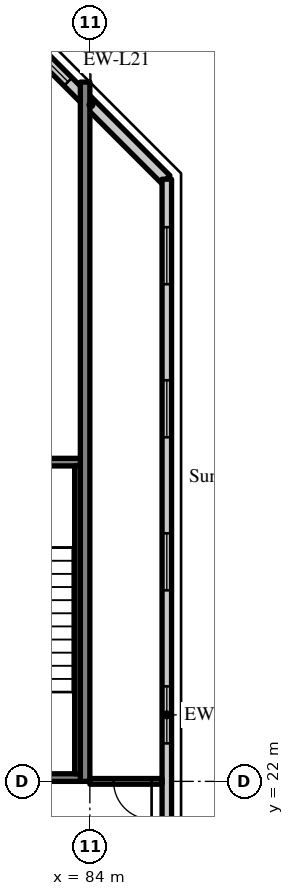
"""IFC4 building model, lengths in metres.
Left out: names, types, materials, properties, quantities, classifications, styles, units other than length and angle.
Written with IfcOpenShell. Run it as: python <this file> out.ifc"""

import sys

from ifc_helpers import new_model, si_unit, direction, frame, frame_2d, origin, place, context, subcontext, project, spatial, rectangle, extrude, source, transform, mapped, element, fill, save


model = new_model("IFC4")
c1 = context("Model", 3, precision=1e-05, world=origin(), true_north=direction((0.0, 1.0)))
c2 = subcontext(c1, "Body", "Model", "MODEL_VIEW")
j1 = project(units=[si_unit("LENGTHUNIT", "METRE"), si_unit("PLANEANGLEUNIT", "RADIAN")], contexts=[c1])
p1 = place(None, origin())
s1 = spatial("IfcSite", under=j1, at=p1, CompositionType="ELEMENT")
p2 = place(p1, origin())
s2 = spatial("IfcBuilding", under=s1, at=p2, CompositionType="ELEMENT")
p3 = place(p2, frame((0.0, 0.0, 277.7)))
s3 = spatial("IfcBuildingStorey", under=s2, at=p3, CompositionType="ELEMENT", Elevation=277.7)
m1 = source(origin(), c2, "Body", "SweptSolid", [
    extrude(rectangle(XDim=18.4, YDim=0.25, at=frame_2d((9.2, 0.0))), origin(), (0.0, 0.0, 1.0), 3.72),
])
p4 = place(p3, frame((83.875, 22.0, 0.0), z_axis=(0.0, 0.0, 1.0), x_axis=(0.0, 1.0, 0.0)))
e1 = element("IfcWall", 1, at=p4, inside=s3, PredefinedType="SHEAR", context=c2, shape_type="MappedRepresentation", body=[
    mapped(m1, transform((0.0, 0.0, 0.0), scale=1.0)),
])
m2 = source(origin(), c2, "Body", "SweptSolid", [
    extrude(rectangle(XDim=5.576, YDim=0.3, at=frame_2d((2.788, 0.0))), origin(), (0.0, 0.0, 1.0), 3.72),
])
p5 = place(p3, frame((86.0, 37.834, 0.0), z_axis=(0.0, 0.0, 1.0), x_axis=(-0.707106781187, 0.707106781187, 0.0)))
e2 = element("IfcWall", 2, at=p5, inside=s3, PredefinedType="SOLIDWALL", context=c2, shape_type="MappedRepresentation", body=[
    mapped(m2, transform((0.0, 0.0, 0.0), scale=1.0)),
])
m3 = source(origin(), c2, "Body", "SweptSolid", [
    extrude(rectangle(XDim=1.8, YDim=1.5, at=frame_2d((0.9, 0.75))), frame((0.0, 0.16, 0.0), z_axis=(0.0, -1.0, 0.0), x_axis=(1.0, 0.0, 0.0)), (0.0, 0.0, 1.0), 0.32),
])
p6 = place(p5, frame((3.641, 0.0, 0.9)))
e3 = element("IfcOpeningElement", 3, at=p6, cuts=e2, PredefinedType="OPENING", context=c2, shape_type="MappedRepresentation", body=[
    mapped(m3, transform((0.0, 0.0, 0.0), scale=1.0)),
])
m4 = source(origin(), c2, "Body", "SweptSolid", [
    extrude(rectangle(XDim=28.189, YDim=0.25, at=frame_2d((14.095, 0.0))), origin(), (0.0, 0.0, 1.0), 3.72),
])
p7 = place(p3, frame((86.025, 9.655, 0.0), z_axis=(0.0, 0.0, 1.0), x_axis=(0.0, 1.0, 0.0)))
e4 = element("IfcWall", 4, at=p7, inside=s3, PredefinedType="SOLIDWALL", context=c2, shape_type="MappedRepresentation", body=[
    mapped(m4, transform((0.0, 0.0, 0.0), scale=1.0)),
])
m5 = source(origin(), c2, "Body", "SweptSolid", [
    extrude(rectangle(XDim=1.5, YDim=1.5, at=frame_2d((0.75, 0.75))), frame((0.0, 0.135, 0.0), z_axis=(0.0, -1.0, 0.0), x_axis=(1.0, 0.0, 0.0)), (0.0, 0.0, 1.0), 0.27),
])
p8 = place(p7, frame((1.263, 0.0, 0.9)))
e5 = element("IfcOpeningElement", 5, at=p8, cuts=e4, PredefinedType="OPENING", context=c2, shape_type="MappedRepresentation", body=[
    mapped(m5, transform((0.0, 0.0, 0.0), scale=1.0)),
])
p9 = place(p7, frame((5.291, 0.0, 0.9)))
e6 = element("IfcOpeningElement", 6, at=p9, cuts=e4, PredefinedType="OPENING", context=c2, shape_type="MappedRepresentation", body=[
    mapped(m5, transform((0.0, 0.0, 0.0), scale=1.0)),
])
p10 = place(p7, frame((9.318, 0.0, 0.9)))
e7 = element("IfcOpeningElement", 7, at=p10, cuts=e4, PredefinedType="OPENING", context=c2, shape_type="MappedRepresentation", body=[
    mapped(m5, transform((0.0, 0.0, 0.0), scale=1.0)),
])
p11 = place(p7, frame((13.345, 0.0, 0.9)))
e8 = element("IfcOpeningElement", 8, at=p11, cuts=e4, PredefinedType="OPENING", context=c2, shape_type="MappedRepresentation", body=[
    mapped(m5, transform((0.0, 0.0, 0.0), scale=1.0)),
])
p12 = place(p7, frame((17.372, 0.0, 0.9)))
e9 = element("IfcOpeningElement", 9, at=p12, cuts=e4, PredefinedType="OPENING", context=c2, shape_type="MappedRepresentation", body=[
    mapped(m5, transform((0.0, 0.0, 0.0), scale=1.0)),
])
p13 = place(p7, frame((21.399, 0.0, 0.9)))
e10 = element("IfcOpeningElement", 10, at=p13, cuts=e4, PredefinedType="OPENING", context=c2, shape_type="MappedRepresentation", body=[
    mapped(m5, transform((0.0, 0.0, 0.0), scale=1.0)),
])
p14 = place(p7, frame((25.426, 0.0, 0.9)))
e11 = element("IfcOpeningElement", 11, at=p14, cuts=e4, PredefinedType="OPENING", context=c2, shape_type="MappedRepresentation", body=[
    mapped(m5, transform((0.0, 0.0, 0.0), scale=1.0)),
])
m6 = source(origin(), c2, "Body", "SweptSolid", [
    extrude(rectangle(XDim=8.15, YDim=0.2, at=frame_2d((4.075, 0.0))), origin(), (0.0, 0.0, 1.0), 3.72),
])
p15 = place(p3, frame((83.75, 22.1, 0.0), z_axis=(0.0, 0.0, 1.0), x_axis=(-1.0, 0.0, 0.0)))
e12 = element("IfcWall", 12, at=p15, inside=s3, PredefinedType="SOLIDWALL", context=c2, shape_type="MappedRepresentation", body=[
    mapped(m6, transform((0.0, 0.0, 0.0), scale=1.0)),
])
m7 = source(origin(), c2, "Body", "SweptSolid", [
    extrude(rectangle(XDim=1.2, YDim=2.1, at=frame_2d((0.6, 1.05))), frame((0.0, 0.11, 0.0), z_axis=(0.0, -1.0, 0.0), x_axis=(1.0, 0.0, 0.0)), (0.0, 0.0, 1.0), 0.22),
])
p16 = place(p15, frame((5.95, 0.0, 0.0)))
e13 = element("IfcOpeningElement", 13, at=p16, cuts=e12, PredefinedType="OPENING", context=c2, shape_type="MappedRepresentation", body=[
    mapped(m7, transform((0.0, 0.0, 0.0), scale=1.0)),
])
p17 = place(p3, frame((83.75, 30.4, 0.0), z_axis=(0.0, 0.0, 1.0), x_axis=(-1.0, 0.0, 0.0)))
e14 = element("IfcWall", 14, at=p17, inside=s3, PredefinedType="SOLIDWALL", context=c2, shape_type="MappedRepresentation", body=[
    mapped(m6, transform((0.0, 0.0, 0.0), scale=1.0)),
])
m8 = source(origin(), c2, "Body", "SweptSolid", [
    extrude(rectangle(XDim=1.0, YDim=2.1, at=frame_2d((0.5, 1.05))), frame((0.0, 0.11, 0.0), z_axis=(0.0, -1.0, 0.0), x_axis=(1.0, 0.0, 0.0)), (0.0, 0.0, 1.0), 0.22),
])
p18 = place(p17, frame((6.05, 0.0, 0.0)))
e15 = element("IfcOpeningElement", 15, at=p18, cuts=e14, PredefinedType="OPENING", context=c2, shape_type="MappedRepresentation", body=[
    mapped(m8, transform((0.0, 0.0, 0.0), scale=1.0)),
])
m9 = source(origin(), c2, "Body", "SweptSolid", [
    extrude(rectangle(XDim=8.1, YDim=0.15, at=frame_2d((4.05, 0.0))), origin(), (0.0, 0.0, 1.0), 3.72),
])
p19 = place(p3, frame((83.675, 22.2, 0.0), z_axis=(0.0, 0.0, 1.0), x_axis=(0.0, 1.0, 0.0)))
e16 = element("IfcWall", 16, at=p19, inside=s3, PredefinedType="SOLIDWALL", context=c2, shape_type="MappedRepresentation", body=[
    mapped(m9, transform((0.0, 0.0, 0.0), scale=1.0)),
])
m10 = source(origin(), c2, "Body", "SweptSolid", [
    extrude(rectangle(XDim=1.9, YDim=0.15, at=frame_2d((0.95, 0.0))), origin(), (0.0, 0.0, 1.0), 3.02),
])
p20 = place(p3, frame((84.0, 22.0, 0.0), z_axis=(0.0, 0.0, 1.0), x_axis=(1.0, 0.0, 0.0)))
e17 = element("IfcWall", 17, at=p20, inside=s3, PredefinedType="PARTITIONING", context=c2, shape_type="MappedRepresentation", body=[
    mapped(m10, transform((0.0, 0.0, 0.0), scale=1.0)),
])
m11 = source(origin(), c2, "Body", "SweptSolid", [
    extrude(rectangle(XDim=1.0, YDim=2.1, at=frame_2d((0.5, 1.05))), frame((0.0, 0.085, 0.0), z_axis=(0.0, -1.0, 0.0), x_axis=(1.0, 0.0, 0.0)), (0.0, 0.0, 1.0), 0.17),
])
p21 = place(p20, frame((0.625, 0.0, 0.0)))
e18 = element("IfcOpeningElement", 18, at=p21, cuts=e17, PredefinedType="OPENING", context=c2, shape_type="MappedRepresentation", body=[
    mapped(m11, transform((0.0, 0.0, 0.0), scale=1.0)),
])
m12 = source(origin(), c2, "Body", "SweptSolid", [
    extrude(rectangle(XDim=1.8, YDim=1.5, at=frame_2d((0.9, 0.75))), frame((0.0, 0.03, 0.0), z_axis=(0.0, -1.0, 0.0), x_axis=(1.0, 0.0, 0.0)), (0.0, 0.0, 1.0), 0.06),
])
p22 = place(p6, origin())
e19 = element("IfcWindow", 19, at=p22, inside=s3, PartitioningType="SINGLE_PANEL", PredefinedType="WINDOW", context=c2, shape_type="MappedRepresentation", body=[
    mapped(m12, transform((0.0, 0.0, 0.0), scale=1.0)),
])
fill(e3, e19)
m13 = source(origin(), c2, "Body", "SweptSolid", [
    extrude(rectangle(XDim=1.5, YDim=1.5, at=frame_2d((0.75, 0.75))), frame((0.0, 0.03, 0.0), z_axis=(0.0, -1.0, 0.0), x_axis=(1.0, 0.0, 0.0)), (0.0, 0.0, 1.0), 0.06),
])
p23 = place(p11, origin())
e20 = element("IfcWindow", 20, at=p23, inside=s3, PartitioningType="SINGLE_PANEL", PredefinedType="WINDOW", context=c2, shape_type="MappedRepresentation", body=[
    mapped(m13, transform((0.0, 0.0, 0.0), scale=1.0)),
])
fill(e8, e20)
p24 = place(p12, origin())
e21 = element("IfcWindow", 21, at=p24, inside=s3, PartitioningType="SINGLE_PANEL", PredefinedType="WINDOW", context=c2, shape_type="MappedRepresentation", body=[
    mapped(m13, transform((0.0, 0.0, 0.0), scale=1.0)),
])
fill(e9, e21)
p25 = place(p13, origin())
e22 = element("IfcWindow", 22, at=p25, inside=s3, PartitioningType="SINGLE_PANEL", PredefinedType="WINDOW", context=c2, shape_type="MappedRepresentation", body=[
    mapped(m13, transform((0.0, 0.0, 0.0), scale=1.0)),
])
fill(e10, e22)
p26 = place(p14, origin())
e23 = element("IfcWindow", 23, at=p26, inside=s3, PartitioningType="SINGLE_PANEL", PredefinedType="WINDOW", context=c2, shape_type="MappedRepresentation", body=[
    mapped(m13, transform((0.0, 0.0, 0.0), scale=1.0)),
])
fill(e11, e23)
m14 = source(origin(), c2, "Body", "SweptSolid", [
    extrude(rectangle(XDim=1.0, YDim=2.1, at=frame_2d((0.5, 1.05))), frame((0.0, 0.025, 0.0), z_axis=(0.0, -1.0, 0.0), x_axis=(1.0, 0.0, 0.0)), (0.0, 0.0, 1.0), 0.05),
])
p27 = place(p21, origin())
e24 = element("IfcDoor", 24, at=p27, inside=s3, OperationType="SINGLE_SWING_RIGHT", PredefinedType="DOOR", context=c2, shape_type="MappedRepresentation", body=[
    mapped(m14, transform((0.0, 0.0, 0.0), scale=1.0)),
])
fill(e18, e24)
save(model, sys.argv[1])
